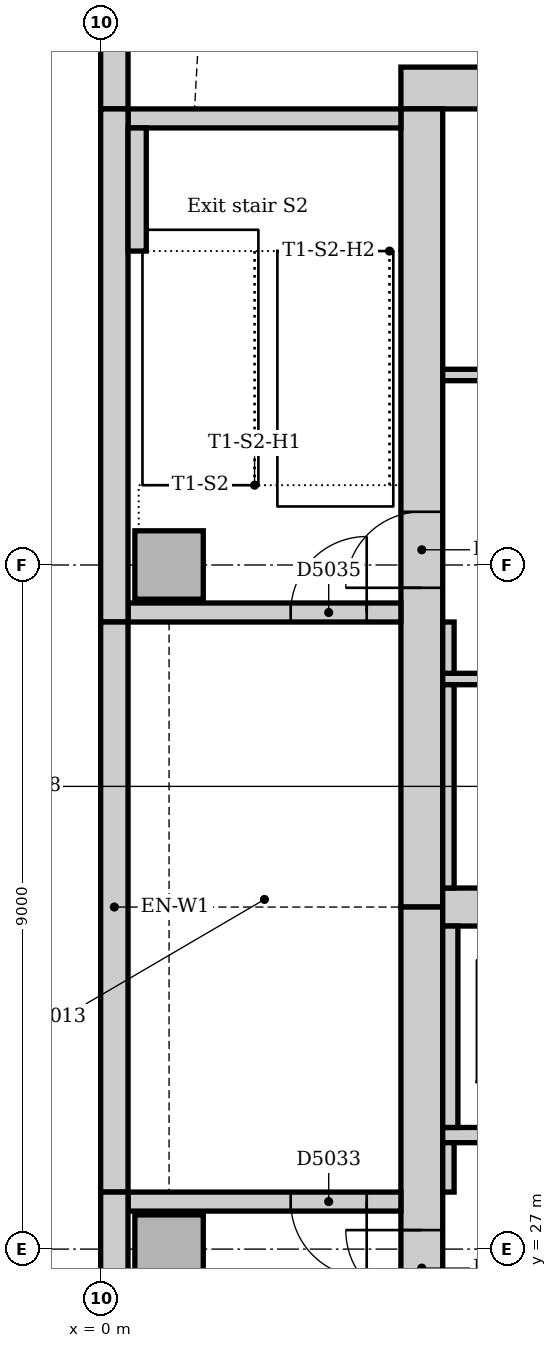
"""IFC4 building model, lengths in metres.
Left out: names, types, materials, properties, quantities, classifications, styles, units other than length and angle.
Written with IfcOpenShell. Run it as: python <this file> out.ifc"""

import sys

from ifc_helpers import new_model, si_unit, direction, frame, frame_2d, origin, origin_2d, place, context, subcontext, project, spatial, rectangle, extrude, element, fill, save


model = new_model("IFC4")
c1 = context("Model", 3, precision=1e-05, world=origin(), true_north=direction((0.0, 1.0)))
c2 = subcontext(c1, "Body", "Model", "MODEL_VIEW")
j1 = project(units=[si_unit("LENGTHUNIT", "METRE"), si_unit("PLANEANGLEUNIT", "RADIAN")], contexts=[c1])
p1 = place(None, origin())
s1 = spatial("IfcSite", under=j1, at=p1, CompositionType="ELEMENT")
p2 = place(p1, origin())
s2 = spatial("IfcBuilding", under=s1, at=p2, CompositionType="ELEMENT")
p3 = place(p2, frame((0.0, 0.0, 210.0)))
s3 = spatial("IfcBuildingStorey", under=s2, at=p3, CompositionType="ELEMENT", Elevation=210.0)
p4 = place(p3, frame((23.05, 42.275, 0.0), z_axis=(0.0, 0.0, 1.0), x_axis=(-1.0, 0.0, 0.0)))
e1 = element("IfcWall", 1, at=p4, inside=s3, PredefinedType="SOLIDWALL", context=c2, shape_type="SweptSolid", body=[
    extrude(rectangle(XDim=19.1, YDim=0.55, at=frame_2d((9.55, 0.0))), origin(), (0.0, 0.0, 1.0), 4.0),
])
p5 = place(p3, frame((4.225, 42.0, 0.0), z_axis=(0.0, 0.0, 1.0), x_axis=(0.0, -1.0, 0.0)))
e2 = element("IfcWall", 2, at=p5, inside=s3, PredefinedType="SOLIDWALL", context=c2, shape_type="SweptSolid", body=[
    extrude(rectangle(XDim=10.5, YDim=0.55, at=frame_2d((5.25, 0.0))), origin(), (0.0, 0.0, 1.0), 4.0),
])
p6 = place(p5, frame((5.3, 0.0, 0.0)))
e3 = element("IfcOpeningElement", 3, at=p6, cuts=e2, PredefinedType="OPENING", context=c2, shape_type="SweptSolid", body=[
    extrude(rectangle(XDim=1.0, YDim=2.1, at=frame_2d((0.5, 1.05))), frame((0.0, 0.285, 0.0), z_axis=(0.0, -1.0, 0.0), x_axis=(1.0, 0.0, 0.0)), (0.0, 0.0, 1.0), 0.57),
])
p7 = place(p3, frame((4.225, 31.5, 0.0), z_axis=(0.0, 0.0, 1.0), x_axis=(0.0, -1.0, 0.0)))
e4 = element("IfcWall", 4, at=p7, inside=s3, PredefinedType="SOLIDWALL", context=c2, shape_type="SweptSolid", body=[
    extrude(rectangle(XDim=10.5, YDim=0.55, at=frame_2d((5.25, 0.0))), origin(), (0.0, 0.0, 1.0), 4.0),
])
p8 = place(p7, frame((4.25, 0.0, 0.0)))
e5 = element("IfcOpeningElement", 5, at=p8, cuts=e4, PredefinedType="OPENING", context=c2, shape_type="SweptSolid", body=[
    extrude(rectangle(XDim=1.0, YDim=2.1, at=frame_2d((0.5, 1.05))), frame((0.0, 0.285, 0.0), z_axis=(0.0, -1.0, 0.0), x_axis=(1.0, 0.0, 0.0)), (0.0, 0.0, 1.0), 0.57),
])
p9 = place(p3, frame((4.5, 31.5, 0.0), z_axis=(0.0, 0.0, 1.0), x_axis=(1.0, 0.0, 0.0)))
e6 = element("IfcWall", 6, at=p9, inside=s3, PredefinedType="SOLIDWALL", context=c2, shape_type="SweptSolid", body=[
    extrude(rectangle(XDim=18.0, YDim=0.5, at=frame_2d((9.0, 0.0))), origin(), (0.0, 0.0, 1.0), 4.0),
])
p10 = place(p3, frame((3.95, 27.625, 0.0), z_axis=(0.0, 0.0, 1.0), x_axis=(-1.0, 0.0, 0.0)))
e7 = element("IfcWall", 7, at=p10, inside=s3, PredefinedType="SOLIDWALL", context=c2, shape_type="SweptSolid", body=[
    extrude(rectangle(XDim=3.59, YDim=0.25, at=frame_2d((1.795, 0.0))), origin(), (0.0, 0.0, 1.0), 4.0),
])
p11 = place(p10, frame((0.45, 0.0, 0.0)))
e8 = element("IfcOpeningElement", 8, at=p11, cuts=e7, PredefinedType="OPENING", context=c2, shape_type="SweptSolid", body=[
    extrude(rectangle(XDim=1.0, YDim=2.1, at=frame_2d((0.5, 1.05))), frame((0.0, 0.135, 0.0), z_axis=(0.0, -1.0, 0.0), x_axis=(1.0, 0.0, 0.0)), (0.0, 0.0, 1.0), 0.27),
])
p12 = place(p3, frame((0.36, 35.375, 0.0), z_axis=(0.0, 0.0, 1.0), x_axis=(1.0, 0.0, 0.0)))
e9 = element("IfcWall", 9, at=p12, inside=s3, PredefinedType="SOLIDWALL", context=c2, shape_type="SweptSolid", body=[
    extrude(rectangle(XDim=3.59, YDim=0.25, at=frame_2d((1.795, 0.0))), origin(), (0.0, 0.0, 1.0), 4.0),
])
p13 = place(p12, frame((2.14, 0.0, 0.0)))
e10 = element("IfcOpeningElement", 10, at=p13, cuts=e9, PredefinedType="OPENING", context=c2, shape_type="SweptSolid", body=[
    extrude(rectangle(XDim=1.0, YDim=2.1, at=frame_2d((0.5, 1.05))), frame((0.0, 0.135, 0.0), z_axis=(0.0, -1.0, 0.0), x_axis=(1.0, 0.0, 0.0)), (0.0, 0.0, 1.0), 0.27),
])
p14 = place(p3, frame((3.95, 41.875, 0.0), z_axis=(0.0, 0.0, 1.0), x_axis=(-1.0, 0.0, 0.0)))
e11 = element("IfcWall", 11, at=p14, inside=s3, PredefinedType="SOLIDWALL", context=c2, shape_type="SweptSolid", body=[
    extrude(rectangle(XDim=3.59, YDim=0.25, at=frame_2d((1.795, 0.0))), origin(), (0.0, 0.0, 1.0), 4.0),
])
for number, where, z_axis, x_axis in (
    (12, (0.9, 27.0, 0.0), (0.0, 0.0, 1.0), (1.0, 0.0, 0.0)),
    (13, (0.9, 36.0, 0.0), (0.0, 0.0, 1.0), (1.0, 0.0, 0.0)),
):
    element("IfcColumn", number, at=place(p3, frame(where, z_axis=z_axis, x_axis=x_axis)), inside=s3, PredefinedType="COLUMN", context=c2, shape_type="SweptSolid", body=[
        extrude(rectangle(XDim=0.9, YDim=0.9, at=origin_2d()), origin(), (0.0, 0.0, 1.0), 4.0),
    ])
p15 = place(p3, frame((0.18, 54.257, 0.0), z_axis=(0.0, 0.0, 1.0), x_axis=(0.0, -1.0, 0.0)))
e14 = element("IfcWall", 14, at=p15, inside=s3, PredefinedType="STANDARD", context=c2, shape_type="SweptSolid", body=[
    extrude(rectangle(XDim=12.257, YDim=0.36, at=frame_2d((6.129, 0.0))), origin(), (0.0, 0.0, 1.0), 3.85),
])
p16 = place(p15, frame((3.107, 0.0, 0.9)))
e15 = element("IfcOpeningElement", 15, at=p16, cuts=e14, PredefinedType="OPENING", context=c2, shape_type="SweptSolid", body=[
    extrude(rectangle(XDim=3.3, YDim=1.6, at=frame_2d((1.65, 0.8))), frame((0.0, 0.19, 0.0), z_axis=(0.0, -1.0, 0.0), x_axis=(1.0, 0.0, 0.0)), (0.0, 0.0, 1.0), 0.38),
])
p17 = place(p15, frame((7.607, 0.0, 0.9)))
e16 = element("IfcOpeningElement", 16, at=p17, cuts=e14, PredefinedType="OPENING", context=c2, shape_type="SweptSolid", body=[
    extrude(rectangle(XDim=3.3, YDim=1.6, at=frame_2d((1.65, 0.8))), frame((0.0, 0.19, 0.0), z_axis=(0.0, -1.0, 0.0), x_axis=(1.0, 0.0, 0.0)), (0.0, 0.0, 1.0), 0.38),
])
p18 = place(p3, frame((0.18, 42.0, 0.0), z_axis=(0.0, 0.0, 1.0), x_axis=(0.0, -1.0, 0.0)))
e17 = element("IfcWall", 17, at=p18, inside=s3, PredefinedType="STANDARD", context=c2, shape_type="SweptSolid", body=[
    extrude(rectangle(XDim=6.75, YDim=0.36, at=frame_2d((3.375, 0.0))), origin(), (0.0, 0.0, 1.0), 3.85),
])
p19 = place(p3, frame((0.18, 35.25, 0.0), z_axis=(0.0, 0.0, 1.0), x_axis=(0.0, -1.0, 0.0)))
e18 = element("IfcWall", 18, at=p19, inside=s3, PredefinedType="STANDARD", context=c2, shape_type="SweptSolid", body=[
    extrude(rectangle(XDim=7.5, YDim=0.36, at=frame_2d((3.75, 0.0))), origin(), (0.0, 0.0, 1.0), 3.85),
])
p20 = place(p3, frame((0.18, 27.75, 0.0), z_axis=(0.0, 0.0, 1.0), x_axis=(0.0, -1.0, 0.0)))
e19 = element("IfcWall", 19, at=p20, inside=s3, PredefinedType="STANDARD", context=c2, shape_type="SweptSolid", body=[
    extrude(rectangle(XDim=6.75, YDim=0.36, at=frame_2d((3.375, 0.0))), origin(), (0.0, 0.0, 1.0), 3.85),
])
p21 = place(p3, frame((0.48, 40.13, 0.0), z_axis=(0.0, 0.0, 1.0), x_axis=(0.0, 1.0, 0.0)))
e20 = element("IfcWall", 20, at=p21, inside=s3, PredefinedType="STANDARD", context=c2, shape_type="SweptSolid", body=[
    extrude(rectangle(XDim=1.62, YDim=0.24, at=frame_2d((0.81, 0.0))), origin(), (0.0, 0.0, 1.0), 4.0),
])
p22 = place(p3, frame((4.5, 28.5, 0.0), z_axis=(0.0, 0.0, 1.0), x_axis=(1.0, 0.0, 0.0)))
e21 = element("IfcWall", 21, at=p22, inside=s3, PredefinedType="PARTITIONING", context=c2, shape_type="SweptSolid", body=[
    extrude(rectangle(XDim=18.0, YDim=0.2, at=frame_2d((9.0, 0.0))), origin(), (0.0, 0.0, 1.0), 3.85),
])
p23 = place(p22, frame((0.95, 0.0, 0.0)))
e22 = element("IfcOpeningElement", 22, at=p23, cuts=e21, PredefinedType="OPENING", context=c2, shape_type="SweptSolid", body=[
    extrude(rectangle(XDim=1.1, YDim=2.1, at=frame_2d((0.55, 1.05))), frame((0.0, 0.11, 0.0), z_axis=(0.0, -1.0, 0.0), x_axis=(1.0, 0.0, 0.0)), (0.0, 0.0, 1.0), 0.22),
])
p24 = place(p22, frame((3.95, 0.0, 0.0)))
e23 = element("IfcOpeningElement", 23, at=p24, cuts=e21, PredefinedType="OPENING", context=c2, shape_type="SweptSolid", body=[
    extrude(rectangle(XDim=1.1, YDim=2.1, at=frame_2d((0.55, 1.05))), frame((0.0, 0.11, 0.0), z_axis=(0.0, -1.0, 0.0), x_axis=(1.0, 0.0, 0.0)), (0.0, 0.0, 1.0), 0.22),
])
p25 = place(p22, frame((6.95, 0.0, 0.0)))
e24 = element("IfcOpeningElement", 24, at=p25, cuts=e21, PredefinedType="OPENING", context=c2, shape_type="SweptSolid", body=[
    extrude(rectangle(XDim=1.1, YDim=2.1, at=frame_2d((0.55, 1.05))), frame((0.0, 0.11, 0.0), z_axis=(0.0, -1.0, 0.0), x_axis=(1.0, 0.0, 0.0)), (0.0, 0.0, 1.0), 0.22),
])
p26 = place(p22, frame((9.95, 0.0, 0.0)))
e25 = element("IfcOpeningElement", 25, at=p26, cuts=e21, PredefinedType="OPENING", context=c2, shape_type="SweptSolid", body=[
    extrude(rectangle(XDim=1.1, YDim=2.1, at=frame_2d((0.55, 1.05))), frame((0.0, 0.11, 0.0), z_axis=(0.0, -1.0, 0.0), x_axis=(1.0, 0.0, 0.0)), (0.0, 0.0, 1.0), 0.22),
])
p27 = place(p22, frame((12.95, 0.0, 0.0)))
e26 = element("IfcOpeningElement", 26, at=p27, cuts=e21, PredefinedType="OPENING", context=c2, shape_type="SweptSolid", body=[
    extrude(rectangle(XDim=1.1, YDim=2.1, at=frame_2d((0.55, 1.05))), frame((0.0, 0.11, 0.0), z_axis=(0.0, -1.0, 0.0), x_axis=(1.0, 0.0, 0.0)), (0.0, 0.0, 1.0), 0.22),
])
p28 = place(p22, frame((15.95, 0.0, 0.0)))
e27 = element("IfcOpeningElement", 27, at=p28, cuts=e21, PredefinedType="OPENING", context=c2, shape_type="SweptSolid", body=[
    extrude(rectangle(XDim=1.1, YDim=2.1, at=frame_2d((0.55, 1.05))), frame((0.0, 0.11, 0.0), z_axis=(0.0, -1.0, 0.0), x_axis=(1.0, 0.0, 0.0)), (0.0, 0.0, 1.0), 0.22),
])
p29 = place(p3, frame((4.6, 28.6, 0.0), z_axis=(0.0, 0.0, 1.0), x_axis=(0.0, 1.0, 0.0)))
e28 = element("IfcWall", 28, at=p29, inside=s3, PredefinedType="PARTITIONING", context=c2, shape_type="SweptSolid", body=[
    extrude(rectangle(XDim=2.65, YDim=0.2, at=frame_2d((1.325, 0.0))), origin(), (0.0, 0.0, 1.0), 3.85),
])
p30 = place(p3, frame((4.5, 38.5, 0.0), z_axis=(0.0, 0.0, 1.0), x_axis=(1.0, 0.0, 0.0)))
e29 = element("IfcWall", 29, at=p30, inside=s3, PredefinedType="PARTITIONING", context=c2, shape_type="SweptSolid", body=[
    extrude(rectangle(XDim=11.9, YDim=0.15, at=frame_2d((5.95, 0.0))), origin(), (0.0, 0.0, 1.0), 3.85),
])
p31 = place(p30, frame((1.85, 0.0, 0.0)))
e30 = element("IfcOpeningElement", 30, at=p31, cuts=e29, PredefinedType="OPENING", context=c2, shape_type="SweptSolid", body=[
    extrude(rectangle(XDim=0.9, YDim=2.1, at=frame_2d((0.45, 1.05))), frame((0.0, 0.085, 0.0), z_axis=(0.0, -1.0, 0.0), x_axis=(1.0, 0.0, 0.0)), (0.0, 0.0, 1.0), 0.17),
])
p32 = place(p30, frame((5.55, 0.0, 0.0)))
e31 = element("IfcOpeningElement", 31, at=p32, cuts=e29, PredefinedType="OPENING", context=c2, shape_type="SweptSolid", body=[
    extrude(rectangle(XDim=0.9, YDim=2.1, at=frame_2d((0.45, 1.05))), frame((0.0, 0.085, 0.0), z_axis=(0.0, -1.0, 0.0), x_axis=(1.0, 0.0, 0.0)), (0.0, 0.0, 1.0), 0.17),
])
p33 = place(p30, frame((7.8, 0.0, 0.0)))
e32 = element("IfcOpeningElement", 32, at=p33, cuts=e29, PredefinedType="OPENING", context=c2, shape_type="SweptSolid", body=[
    extrude(rectangle(XDim=0.9, YDim=2.1, at=frame_2d((0.45, 1.05))), frame((0.0, 0.085, 0.0), z_axis=(0.0, -1.0, 0.0), x_axis=(1.0, 0.0, 0.0)), (0.0, 0.0, 1.0), 0.17),
])
p34 = place(p30, frame((9.95, 0.0, 0.0)))
e33 = element("IfcOpeningElement", 33, at=p34, cuts=e29, PredefinedType="OPENING", context=c2, shape_type="SweptSolid", body=[
    extrude(rectangle(XDim=0.8, YDim=2.1, at=frame_2d((0.4, 1.05))), frame((0.0, 0.085, 0.0), z_axis=(0.0, -1.0, 0.0), x_axis=(1.0, 0.0, 0.0)), (0.0, 0.0, 1.0), 0.17),
])
p35 = place(p3, frame((4.5, 34.5, 0.0), z_axis=(0.0, 0.0, 1.0), x_axis=(1.0, 0.0, 0.0)))
e34 = element("IfcWall", 34, at=p35, inside=s3, PredefinedType="PARTITIONING", context=c2, shape_type="SweptSolid", body=[
    extrude(rectangle(XDim=5.9, YDim=0.15, at=frame_2d((2.95, 0.0))), origin(), (0.0, 0.0, 1.0), 3.85),
])
p36 = place(p35, frame((1.1, 0.0, 0.0)))
e35 = element("IfcOpeningElement", 35, at=p36, cuts=e34, PredefinedType="OPENING", context=c2, shape_type="SweptSolid", body=[
    extrude(rectangle(XDim=0.9, YDim=2.1, at=frame_2d((0.45, 1.05))), frame((0.0, 0.085, 0.0), z_axis=(0.0, -1.0, 0.0), x_axis=(1.0, 0.0, 0.0)), (0.0, 0.0, 1.0), 0.17),
])
p37 = place(p35, frame((3.9, 0.0, 0.0)))
e36 = element("IfcOpeningElement", 36, at=p37, cuts=e34, PredefinedType="OPENING", context=c2, shape_type="SweptSolid", body=[
    extrude(rectangle(XDim=0.9, YDim=2.1, at=frame_2d((0.45, 1.05))), frame((0.0, 0.085, 0.0), z_axis=(0.0, -1.0, 0.0), x_axis=(1.0, 0.0, 0.0)), (0.0, 0.0, 1.0), 0.17),
])
p38 = place(p3, frame((4.575, 34.575, 0.0), z_axis=(0.0, 0.0, 1.0), x_axis=(0.0, 1.0, 0.0)))
e37 = element("IfcWall", 37, at=p38, inside=s3, PredefinedType="PARTITIONING", context=c2, shape_type="SweptSolid", body=[
    extrude(rectangle(XDim=0.675, YDim=0.15, at=frame_2d((0.338, 0.0))), origin(), (0.0, 0.0, 1.0), 3.85),
])
p39 = place(p3, frame((4.575, 31.75, 0.0), z_axis=(0.0, 0.0, 1.0), x_axis=(0.0, 1.0, 0.0)))
e38 = element("IfcWall", 38, at=p39, inside=s3, PredefinedType="PARTITIONING", context=c2, shape_type="SweptSolid", body=[
    extrude(rectangle(XDim=2.675, YDim=0.15, at=frame_2d((1.337, 0.0))), origin(), (0.0, 0.0, 1.0), 3.85),
])
p40 = place(p3, frame((4.575, 27.75, 0.0), z_axis=(0.0, 0.0, 1.0), x_axis=(0.0, 1.0, 0.0)))
e39 = element("IfcWall", 39, at=p40, inside=s3, PredefinedType="PARTITIONING", context=c2, shape_type="SweptSolid", body=[
    extrude(rectangle(XDim=0.65, YDim=0.15, at=frame_2d((0.325, 0.0))), origin(), (0.0, 0.0, 1.0), 3.85),
])
p41 = place(p8, frame((1.0, 0.0, 0.0), z_axis=(0.0, 0.0, 1.0), x_axis=(-1.0, 0.0, 0.0)))
e40 = element("IfcDoor", 40, at=p41, inside=s3, OperationType="SINGLE_SWING_RIGHT", PredefinedType="DOOR", context=c2, shape_type="SweptSolid", body=[
    extrude(rectangle(XDim=1.0, YDim=2.1, at=frame_2d((0.5, 1.05))), frame((0.0, 0.025, 0.0), z_axis=(0.0, -1.0, 0.0), x_axis=(1.0, 0.0, 0.0)), (0.0, 0.0, 1.0), 0.05),
])
fill(e5, e40)
p42 = place(p11, origin())
e41 = element("IfcDoor", 41, at=p42, inside=s3, OperationType="SINGLE_SWING_LEFT", PredefinedType="DOOR", context=c2, shape_type="SweptSolid", body=[
    extrude(rectangle(XDim=1.0, YDim=2.1, at=frame_2d((0.5, 1.05))), frame((0.0, 0.025, 0.0), z_axis=(0.0, -1.0, 0.0), x_axis=(1.0, 0.0, 0.0)), (0.0, 0.0, 1.0), 0.05),
])
fill(e8, e41)
p43 = place(p6, frame((1.0, 0.0, 0.0), z_axis=(0.0, 0.0, 1.0), x_axis=(-1.0, 0.0, 0.0)))
e42 = element("IfcDoor", 42, at=p43, inside=s3, OperationType="SINGLE_SWING_LEFT", PredefinedType="DOOR", context=c2, shape_type="SweptSolid", body=[
    extrude(rectangle(XDim=1.0, YDim=2.1, at=frame_2d((0.5, 1.05))), frame((0.0, 0.025, 0.0), z_axis=(0.0, -1.0, 0.0), x_axis=(1.0, 0.0, 0.0)), (0.0, 0.0, 1.0), 0.05),
])
fill(e3, e42)
p44 = place(p13, origin())
e43 = element("IfcDoor", 43, at=p44, inside=s3, OperationType="SINGLE_SWING_RIGHT", PredefinedType="DOOR", context=c2, shape_type="SweptSolid", body=[
    extrude(rectangle(XDim=1.0, YDim=2.1, at=frame_2d((0.5, 1.05))), frame((0.0, 0.025, 0.0), z_axis=(0.0, -1.0, 0.0), x_axis=(1.0, 0.0, 0.0)), (0.0, 0.0, 1.0), 0.05),
])
fill(e10, e43)
save(model, sys.argv[1])
